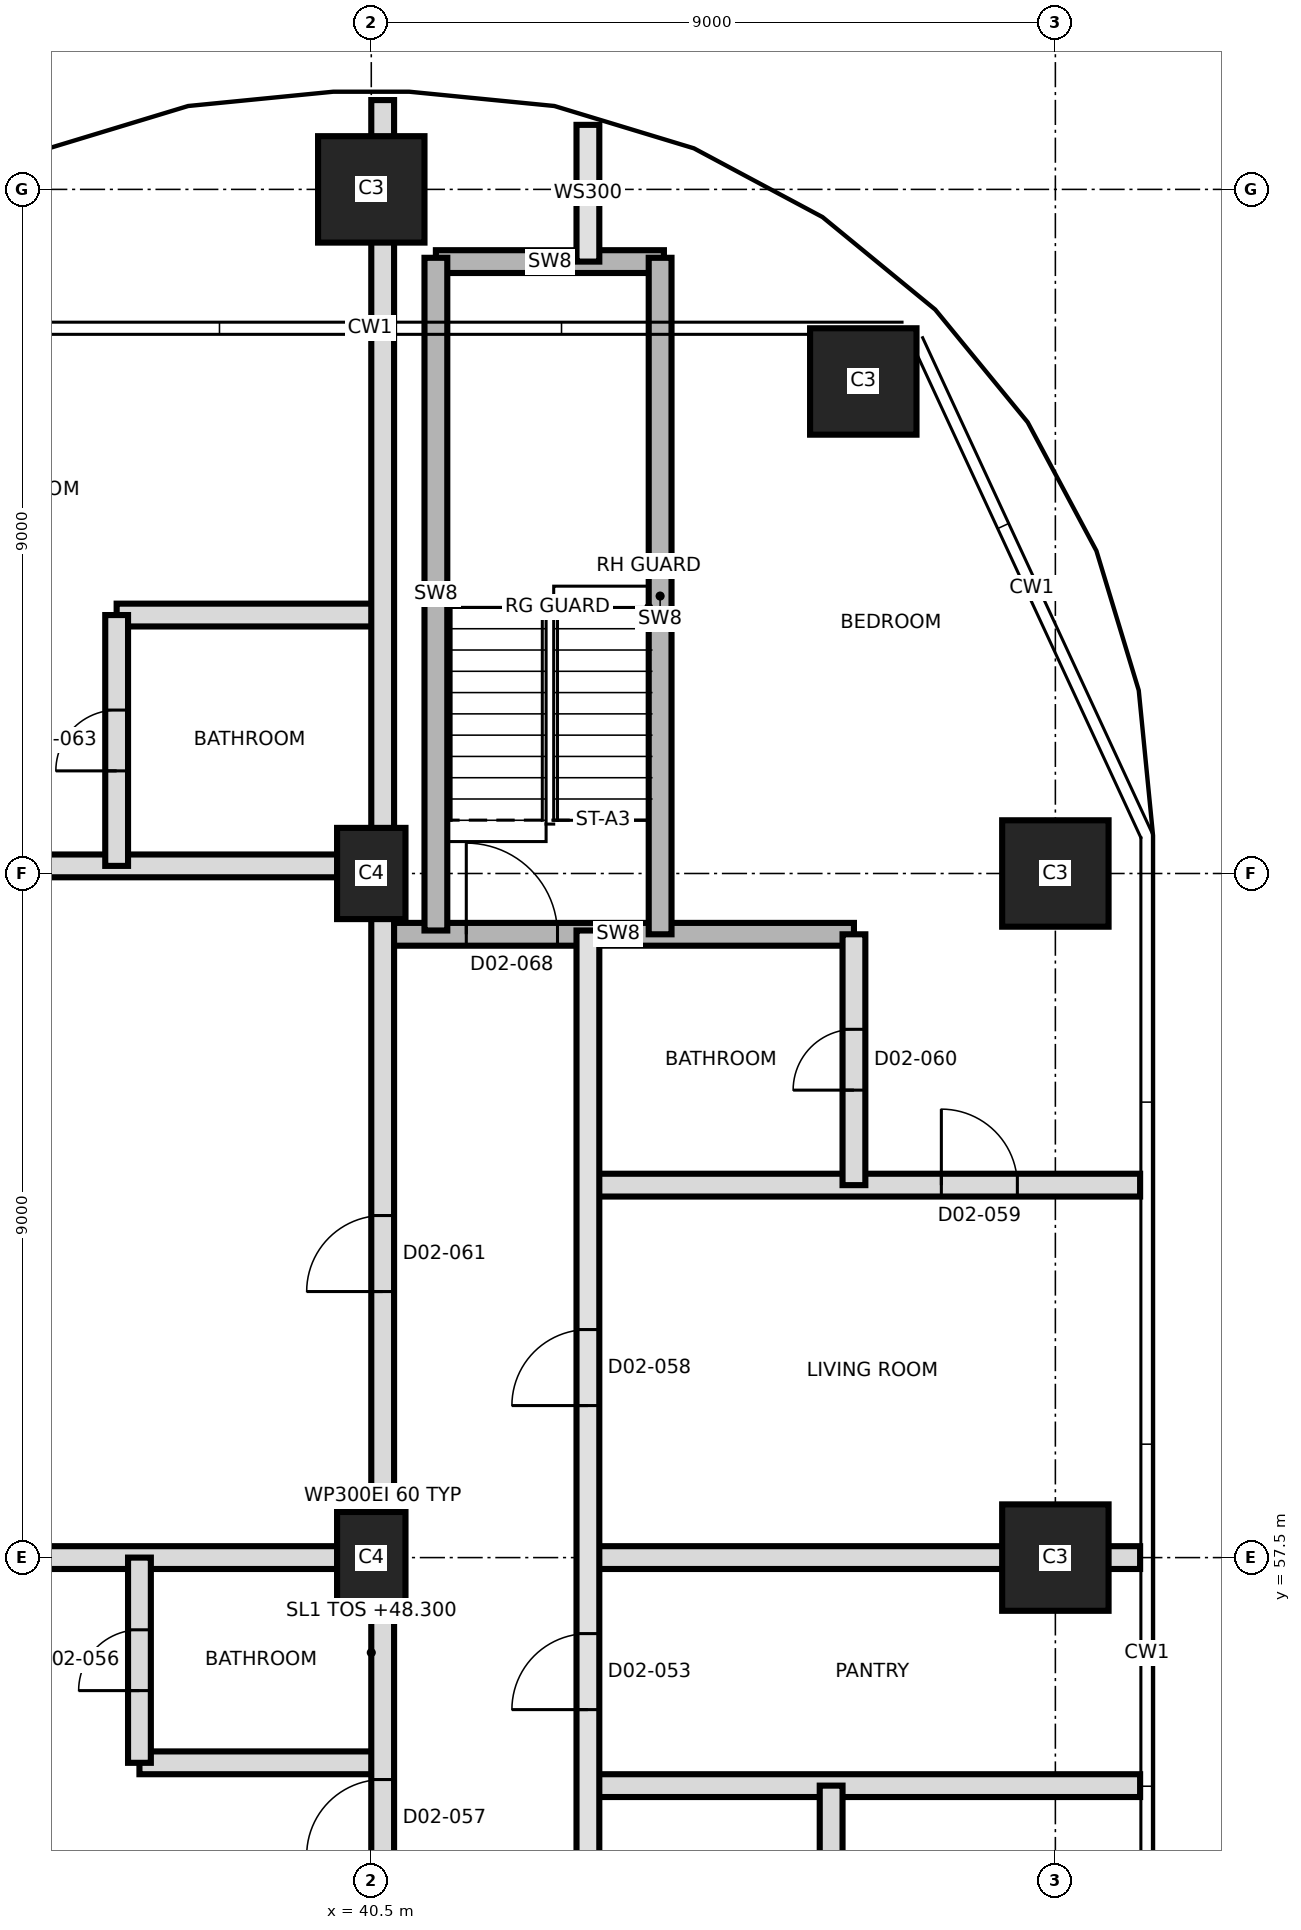
"""IFC4 building model, lengths in metres.
Left out: names, types, materials, properties, quantities, classifications, styles, units other than length and angle.
Written with IfcOpenShell. Run it as: python <this file> out.ifc"""

import sys

from ifc_helpers import new_model, si_unit, direction, frame, frame_2d, origin, origin_2d, place, context, subcontext, project, spatial, rectangle, extrude, element, fill, save


model = new_model("IFC4")
c1 = context("Model", 3, precision=1e-05, world=origin(), true_north=direction((0.0, 1.0)))
c2 = subcontext(c1, "Body", "Model", "MODEL_VIEW")
j1 = project(units=[si_unit("LENGTHUNIT", "METRE"), si_unit("PLANEANGLEUNIT", "RADIAN")], contexts=[c1])
p1 = place(None, origin())
s1 = spatial("IfcSite", under=j1, at=p1, CompositionType="ELEMENT")
p2 = place(p1, origin())
s2 = spatial("IfcBuilding", under=s1, at=p2, CompositionType="ELEMENT")
p3 = place(p2, frame((0.0, 0.0, 48.3)))
s3 = spatial("IfcBuildingStorey", under=s2, at=p3, CompositionType="ELEMENT", Elevation=48.3)
p4 = place(p3, frame((40.5, 57.5, 0.0), z_axis=(0.0, 0.0, 1.0), x_axis=(0.0, 1.0, 0.0)))
e1 = element("IfcColumn", 1, at=p4, inside=s3, PredefinedType="COLUMN", context=c2, shape_type="SweptSolid", body=[
    extrude(rectangle(XDim=1.2, YDim=0.9, at=origin_2d()), origin(), (0.0, 0.0, 1.0), 3.7),
])
p5 = place(p3, frame((49.5, 57.5, 0.0), z_axis=(0.0, 0.0, 1.0), x_axis=(1.0, 0.0, 0.0)))
e2 = element("IfcColumn", 2, at=p5, inside=s3, PredefinedType="COLUMN", context=c2, shape_type="SweptSolid", body=[
    extrude(rectangle(XDim=1.4, YDim=1.4, at=origin_2d()), origin(), (0.0, 0.0, 1.0), 3.7),
])
p6 = place(p3, frame((40.5, 66.5, 0.0), z_axis=(0.0, 0.0, 1.0), x_axis=(0.0, 1.0, 0.0)))
e3 = element("IfcColumn", 3, at=p6, inside=s3, PredefinedType="COLUMN", context=c2, shape_type="SweptSolid", body=[
    extrude(rectangle(XDim=1.2, YDim=0.9, at=origin_2d()), origin(), (0.0, 0.0, 1.0), 3.7),
])
for number, where, z_axis, x_axis in (
    (4, (49.5, 66.5, 0.0), (0.0, 0.0, 1.0), (1.0, 0.0, 0.0)),
    (5, (46.973, 72.973, 0.0), (0.0, 0.0, 1.0), (1.0, 0.0, 0.0)),
    (6, (40.5, 75.5, 0.0), (0.0, 0.0, 1.0), (1.0, 0.0, 0.0)),
):
    element("IfcColumn", number, at=place(p3, frame(where, z_axis=z_axis, x_axis=x_axis)), inside=s3, PredefinedType="COLUMN", context=c2, shape_type="SweptSolid", body=[
        extrude(rectangle(XDim=1.4, YDim=1.4, at=origin_2d()), origin(), (0.0, 0.0, 1.0), 3.7),
    ])
p7 = place(p3, frame((43.35, 54.5, 0.0), z_axis=(0.0, 0.0, 1.0), x_axis=(1.0, 0.0, 0.0)))
e7 = element("IfcWall", 7, at=p7, inside=s3, PredefinedType="PARTITIONING", context=c2, shape_type="SweptSolid", body=[
    extrude(rectangle(XDim=7.265, YDim=0.3, at=frame_2d((3.632, 0.0))), origin(), (0.0, 0.0, 1.0), 3.4),
])
p8 = place(p3, frame((37.45, 54.8, 0.0), z_axis=(0.0, 0.0, 1.0), x_axis=(1.0, 0.0, 0.0)))
e8 = element("IfcWall", 8, at=p8, inside=s3, PredefinedType="PARTITIONING", context=c2, shape_type="SweptSolid", body=[
    extrude(rectangle(XDim=3.2, YDim=0.3, at=frame_2d((1.6, 0.0))), origin(), (0.0, 0.0, 1.0), 3.4),
])
p9 = place(p3, frame((30.565, 57.5, 0.0), z_axis=(0.0, 0.0, 1.0), x_axis=(1.0, 0.0, 0.0)))
e9 = element("IfcWall", 9, at=p9, inside=s3, PredefinedType="PARTITIONING", context=c2, shape_type="SweptSolid", body=[
    extrude(rectangle(XDim=10.085, YDim=0.3, at=frame_2d((5.042, 0.0))), origin(), (0.0, 0.0, 1.0), 3.4),
])
p10 = place(p3, frame((43.35, 57.5, 0.0), z_axis=(0.0, 0.0, 1.0), x_axis=(1.0, 0.0, 0.0)))
e10 = element("IfcWall", 10, at=p10, inside=s3, PredefinedType="PARTITIONING", context=c2, shape_type="SweptSolid", body=[
    extrude(rectangle(XDim=7.265, YDim=0.3, at=frame_2d((3.632, 0.0))), origin(), (0.0, 0.0, 1.0), 3.4),
])
p11 = place(p3, frame((43.35, 62.4, 0.0), z_axis=(0.0, 0.0, 1.0), x_axis=(1.0, 0.0, 0.0)))
e11 = element("IfcWall", 11, at=p11, inside=s3, PredefinedType="PARTITIONING", context=c2, shape_type="SweptSolid", body=[
    extrude(rectangle(XDim=7.265, YDim=0.3, at=frame_2d((3.632, 0.0))), origin(), (0.0, 0.0, 1.0), 3.4),
])
p12 = place(p11, frame((4.65, 0.0, 0.0)))
e12 = element("IfcOpeningElement", 12, at=p12, cuts=e11, PredefinedType="OPENING", context=c2, shape_type="SweptSolid", body=[
    extrude(rectangle(XDim=1.0, YDim=2.1, at=frame_2d((0.5, 1.05))), frame((0.0, 0.16, 0.0), z_axis=(0.0, -1.0, 0.0), x_axis=(1.0, 0.0, 0.0)), (0.0, 0.0, 1.0), 0.32),
])
p13 = place(p3, frame((40.65, 65.7, 0.0), z_axis=(0.0, 0.0, 1.0), x_axis=(1.0, 0.0, 0.0)))
e13 = element("IfcWall", 13, at=p13, inside=s3, PredefinedType="SHEAR", context=c2, shape_type="SweptSolid", body=[
    extrude(rectangle(XDim=6.2, YDim=0.3, at=frame_2d((3.1, 0.0))), origin(), (0.0, 0.0, 1.0), 3.4),
])
p14 = place(p13, frame((1.1, 0.0, 0.0)))
e14 = element("IfcOpeningElement", 14, at=p14, cuts=e13, PredefinedType="OPENING", context=c2, shape_type="SweptSolid", body=[
    extrude(rectangle(XDim=1.2, YDim=2.1, at=frame_2d((0.6, 1.05))), frame((0.0, 0.16, 0.0), z_axis=(0.0, -1.0, 0.0), x_axis=(1.0, 0.0, 0.0)), (0.0, 0.0, 1.0), 0.32),
])
p15 = place(p3, frame((30.565, 66.6, 0.0), z_axis=(0.0, 0.0, 1.0), x_axis=(1.0, 0.0, 0.0)))
e15 = element("IfcWall", 15, at=p15, inside=s3, PredefinedType="PARTITIONING", context=c2, shape_type="SweptSolid", body=[
    extrude(rectangle(XDim=10.085, YDim=0.3, at=frame_2d((5.042, 0.0))), origin(), (0.0, 0.0, 1.0), 3.4),
])
p16 = place(p15, frame((4.435, 0.0, 0.0)))
e16 = element("IfcOpeningElement", 16, at=p16, cuts=e15, PredefinedType="OPENING", context=c2, shape_type="SweptSolid", body=[
    extrude(rectangle(XDim=1.0, YDim=2.1, at=frame_2d((0.5, 1.05))), frame((0.0, 0.16, 0.0), z_axis=(0.0, -1.0, 0.0), x_axis=(1.0, 0.0, 0.0)), (0.0, 0.0, 1.0), 0.32),
])
p17 = place(p3, frame((37.15, 69.9, 0.0), z_axis=(0.0, 0.0, 1.0), x_axis=(1.0, 0.0, 0.0)))
e17 = element("IfcWall", 17, at=p17, inside=s3, PredefinedType="PARTITIONING", context=c2, shape_type="SweptSolid", body=[
    extrude(rectangle(XDim=3.5, YDim=0.3, at=frame_2d((1.75, 0.0))), origin(), (0.0, 0.0, 1.0), 3.4),
])
p18 = place(p3, frame((41.35, 74.55, 0.0), z_axis=(0.0, 0.0, 1.0), x_axis=(1.0, 0.0, 0.0)))
e18 = element("IfcWall", 18, at=p18, inside=s3, PredefinedType="SHEAR", context=c2, shape_type="SweptSolid", body=[
    extrude(rectangle(XDim=3.0, YDim=0.3, at=frame_2d((1.5, 0.0))), origin(), (0.0, 0.0, 1.0), 3.4),
])
p19 = place(p3, frame((37.15, 66.6, 0.0), z_axis=(0.0, 0.0, 1.0), x_axis=(0.0, 1.0, 0.0)))
e19 = element("IfcWall", 19, at=p19, inside=s3, PredefinedType="PARTITIONING", context=c2, shape_type="SweptSolid", body=[
    extrude(rectangle(XDim=3.3, YDim=0.3, at=frame_2d((1.65, 0.0))), origin(), (0.0, 0.0, 1.0), 3.4),
])
p20 = place(p19, frame((1.25, 0.0, 0.0)))
e20 = element("IfcOpeningElement", 20, at=p20, cuts=e19, PredefinedType="OPENING", context=c2, shape_type="SweptSolid", body=[
    extrude(rectangle(XDim=0.8, YDim=2.1, at=frame_2d((0.4, 1.05))), frame((0.0, 0.16, 0.0), z_axis=(0.0, -1.0, 0.0), x_axis=(1.0, 0.0, 0.0)), (0.0, 0.0, 1.0), 0.32),
])
p21 = place(p3, frame((37.45, 54.8, 0.0), z_axis=(0.0, 0.0, 1.0), x_axis=(0.0, 1.0, 0.0)))
e21 = element("IfcWall", 21, at=p21, inside=s3, PredefinedType="PARTITIONING", context=c2, shape_type="SweptSolid", body=[
    extrude(rectangle(XDim=2.7, YDim=0.3, at=frame_2d((1.35, 0.0))), origin(), (0.0, 0.0, 1.0), 3.4),
])
p22 = place(p21, frame((0.95, 0.0, 0.0)))
e22 = element("IfcOpeningElement", 22, at=p22, cuts=e21, PredefinedType="OPENING", context=c2, shape_type="SweptSolid", body=[
    extrude(rectangle(XDim=0.8, YDim=2.1, at=frame_2d((0.4, 1.05))), frame((0.0, 0.16, 0.0), z_axis=(0.0, -1.0, 0.0), x_axis=(1.0, 0.0, 0.0)), (0.0, 0.0, 1.0), 0.32),
])
p23 = place(p3, frame((40.65, 39.95, 0.0), z_axis=(0.0, 0.0, 1.0), x_axis=(0.0, 1.0, 0.0)))
e23 = element("IfcWall", 23, at=p23, inside=s3, PredefinedType="PARTITIONING", context=c2, shape_type="SweptSolid", body=[
    extrude(rectangle(XDim=36.725, YDim=0.3, at=frame_2d((18.363, 0.0))), origin(), (0.0, 0.0, 1.0), 3.4),
])
p24 = place(p23, frame((0.685, 0.0, 0.0)))
e24 = element("IfcOpeningElement", 24, at=p24, cuts=e23, PredefinedType="OPENING", context=c2, shape_type="SweptSolid", body=[
    extrude(rectangle(XDim=1.2, YDim=2.1, at=frame_2d((0.6, 1.05))), frame((0.0, 0.16, 0.0), z_axis=(0.0, -1.0, 0.0), x_axis=(1.0, 0.0, 0.0)), (0.0, 0.0, 1.0), 0.32),
])
p25 = place(p23, frame((3.935, 0.0, 0.0)))
e25 = element("IfcOpeningElement", 25, at=p25, cuts=e23, PredefinedType="OPENING", context=c2, shape_type="SweptSolid", body=[
    extrude(rectangle(XDim=1.0, YDim=2.1, at=frame_2d((0.5, 1.05))), frame((0.0, 0.16, 0.0), z_axis=(0.0, -1.0, 0.0), x_axis=(1.0, 0.0, 0.0)), (0.0, 0.0, 1.0), 0.32),
])
p26 = place(p23, frame((11.83, 0.0, 0.0)))
e26 = element("IfcOpeningElement", 26, at=p26, cuts=e23, PredefinedType="OPENING", context=c2, shape_type="SweptSolid", body=[
    extrude(rectangle(XDim=1.0, YDim=2.1, at=frame_2d((0.5, 1.05))), frame((0.0, 0.16, 0.0), z_axis=(0.0, -1.0, 0.0), x_axis=(1.0, 0.0, 0.0)), (0.0, 0.0, 1.0), 0.32),
])
p27 = place(p23, frame((13.63, 0.0, 0.0)))
e27 = element("IfcOpeningElement", 27, at=p27, cuts=e23, PredefinedType="OPENING", context=c2, shape_type="SweptSolid", body=[
    extrude(rectangle(XDim=1.0, YDim=2.1, at=frame_2d((0.5, 1.05))), frame((0.0, 0.16, 0.0), z_axis=(0.0, -1.0, 0.0), x_axis=(1.0, 0.0, 0.0)), (0.0, 0.0, 1.0), 0.32),
])
p28 = place(p23, frame((21.05, 0.0, 0.0)))
e28 = element("IfcOpeningElement", 28, at=p28, cuts=e23, PredefinedType="OPENING", context=c2, shape_type="SweptSolid", body=[
    extrude(rectangle(XDim=1.0, YDim=2.4, at=frame_2d((0.5, 1.2))), frame((0.0, 0.16, 0.0), z_axis=(0.0, -1.0, 0.0), x_axis=(1.0, 0.0, 0.0)), (0.0, 0.0, 1.0), 0.32),
])
p29 = place(p3, frame((41.35, 65.75, 0.0), z_axis=(0.0, 0.0, 1.0), x_axis=(0.0, 1.0, 0.0)))
e29 = element("IfcWall", 29, at=p29, inside=s3, PredefinedType="SHEAR", context=c2, shape_type="SweptSolid", body=[
    extrude(rectangle(XDim=8.85, YDim=0.3, at=frame_2d((4.425, 0.0))), origin(), (0.0, 0.0, 1.0), 3.4),
])
p30 = place(p3, frame((43.35, 39.95, 0.0), z_axis=(0.0, 0.0, 1.0), x_axis=(0.0, 1.0, 0.0)))
e30 = element("IfcWall", 30, at=p30, inside=s3, PredefinedType="SOLIDWALL", context=c2, shape_type="SweptSolid", body=[
    extrude(rectangle(XDim=25.8, YDim=0.3, at=frame_2d((12.9, 0.0))), origin(), (0.0, 0.0, 1.0), 3.4),
])
p31 = place(p30, frame((3.55, 0.0, 0.0)))
e31 = element("IfcOpeningElement", 31, at=p31, cuts=e30, PredefinedType="OPENING", context=c2, shape_type="SweptSolid", body=[
    extrude(rectangle(XDim=1.0, YDim=2.4, at=frame_2d((0.5, 1.2))), frame((0.0, 0.16, 0.0), z_axis=(0.0, -1.0, 0.0), x_axis=(1.0, 0.0, 0.0)), (0.0, 0.0, 1.0), 0.32),
])
p32 = place(p30, frame((9.7, 0.0, 0.0)))
e32 = element("IfcOpeningElement", 32, at=p32, cuts=e30, PredefinedType="OPENING", context=c2, shape_type="SweptSolid", body=[
    extrude(rectangle(XDim=1.0, YDim=2.1, at=frame_2d((0.5, 1.05))), frame((0.0, 0.16, 0.0), z_axis=(0.0, -1.0, 0.0), x_axis=(1.0, 0.0, 0.0)), (0.0, 0.0, 1.0), 0.32),
])
p33 = place(p30, frame((15.55, 0.0, 0.0)))
e33 = element("IfcOpeningElement", 33, at=p33, cuts=e30, PredefinedType="OPENING", context=c2, shape_type="SweptSolid", body=[
    extrude(rectangle(XDim=1.0, YDim=2.1, at=frame_2d((0.5, 1.05))), frame((0.0, 0.16, 0.0), z_axis=(0.0, -1.0, 0.0), x_axis=(1.0, 0.0, 0.0)), (0.0, 0.0, 1.0), 0.32),
])
p34 = place(p30, frame((19.55, 0.0, 0.0)))
e34 = element("IfcOpeningElement", 34, at=p34, cuts=e30, PredefinedType="OPENING", context=c2, shape_type="SweptSolid", body=[
    extrude(rectangle(XDim=1.0, YDim=2.4, at=frame_2d((0.5, 1.2))), frame((0.0, 0.16, 0.0), z_axis=(0.0, -1.0, 0.0), x_axis=(1.0, 0.0, 0.0)), (0.0, 0.0, 1.0), 0.32),
])
p35 = place(p3, frame((43.35, 74.55, 0.0), z_axis=(0.0, 0.0, 1.0), x_axis=(0.0, 1.0, 0.0)))
e35 = element("IfcWall", 35, at=p35, inside=s3, PredefinedType="SOLIDWALL", context=c2, shape_type="SweptSolid", body=[
    extrude(rectangle(XDim=1.799, YDim=0.3, at=frame_2d((0.899, 0.0))), origin(), (0.0, 0.0, 1.0), 3.4),
])
p36 = place(p3, frame((44.3, 65.7, 0.0), z_axis=(0.0, 0.0, 1.0), x_axis=(0.0, 1.0, 0.0)))
e36 = element("IfcWall", 36, at=p36, inside=s3, PredefinedType="SHEAR", context=c2, shape_type="SweptSolid", body=[
    extrude(rectangle(XDim=8.9, YDim=0.3, at=frame_2d((4.45, 0.0))), origin(), (0.0, 0.0, 1.0), 3.4),
])
p37 = place(p3, frame((46.55, 51.8, 0.0), z_axis=(0.0, 0.0, 1.0), x_axis=(0.0, 1.0, 0.0)))
e37 = element("IfcWall", 37, at=p37, inside=s3, PredefinedType="PARTITIONING", context=c2, shape_type="SweptSolid", body=[
    extrude(rectangle(XDim=2.7, YDim=0.3, at=frame_2d((1.35, 0.0))), origin(), (0.0, 0.0, 1.0), 3.4),
])
p38 = place(p37, frame((0.95, 0.0, 0.0)))
e38 = element("IfcOpeningElement", 38, at=p38, cuts=e37, PredefinedType="OPENING", context=c2, shape_type="SweptSolid", body=[
    extrude(rectangle(XDim=0.8, YDim=2.1, at=frame_2d((0.4, 1.05))), frame((0.0, 0.16, 0.0), z_axis=(0.0, -1.0, 0.0), x_axis=(1.0, 0.0, 0.0)), (0.0, 0.0, 1.0), 0.32),
])
p39 = place(p3, frame((46.85, 62.4, 0.0), z_axis=(0.0, 0.0, 1.0), x_axis=(0.0, 1.0, 0.0)))
e39 = element("IfcWall", 39, at=p39, inside=s3, PredefinedType="PARTITIONING", context=c2, shape_type="SweptSolid", body=[
    extrude(rectangle(XDim=3.3, YDim=0.3, at=frame_2d((1.65, 0.0))), origin(), (0.0, 0.0, 1.0), 3.4),
])
p40 = place(p39, frame((1.25, 0.0, 0.0)))
e40 = element("IfcOpeningElement", 40, at=p40, cuts=e39, PredefinedType="OPENING", context=c2, shape_type="SweptSolid", body=[
    extrude(rectangle(XDim=0.8, YDim=2.1, at=frame_2d((0.4, 1.05))), frame((0.0, 0.16, 0.0), z_axis=(0.0, -1.0, 0.0), x_axis=(1.0, 0.0, 0.0)), (0.0, 0.0, 1.0), 0.32),
])
p41 = place(p33, origin())
e41 = element("IfcDoor", 41, at=p41, inside=s3, OperationType="SINGLE_SWING_LEFT", PredefinedType="DOOR", context=c2, shape_type="SweptSolid", body=[
    extrude(rectangle(XDim=1.0, YDim=2.1, at=frame_2d((0.5, 1.05))), frame((0.0, 0.025, 0.0), z_axis=(0.0, -1.0, 0.0), x_axis=(1.0, 0.0, 0.0)), (0.0, 0.0, 1.0), 0.05),
])
fill(e33, e41)
p42 = place(p22, origin())
e42 = element("IfcDoor", 42, at=p42, inside=s3, OperationType="SINGLE_SWING_LEFT", PredefinedType="DOOR", context=c2, shape_type="SweptSolid", body=[
    extrude(rectangle(XDim=0.8, YDim=2.1, at=frame_2d((0.4, 1.05))), frame((0.0, 0.025, 0.0), z_axis=(0.0, -1.0, 0.0), x_axis=(1.0, 0.0, 0.0)), (0.0, 0.0, 1.0), 0.05),
])
fill(e22, e42)
p43 = place(p27, origin())
e43 = element("IfcDoor", 43, at=p43, inside=s3, OperationType="SINGLE_SWING_LEFT", PredefinedType="DOOR", context=c2, shape_type="SweptSolid", body=[
    extrude(rectangle(XDim=1.0, YDim=2.1, at=frame_2d((0.5, 1.05))), frame((0.0, 0.025, 0.0), z_axis=(0.0, -1.0, 0.0), x_axis=(1.0, 0.0, 0.0)), (0.0, 0.0, 1.0), 0.05),
])
fill(e27, e43)
p44 = place(p34, origin())
e44 = element("IfcDoor", 44, at=p44, inside=s3, OperationType="SINGLE_SWING_RIGHT", PredefinedType="DOOR", context=c2, shape_type="SweptSolid", body=[
    extrude(rectangle(XDim=1.0, YDim=2.4, at=frame_2d((0.5, 1.2))), frame((0.0, 0.025, 0.0), z_axis=(0.0, -1.0, 0.0), x_axis=(1.0, 0.0, 0.0)), (0.0, 0.0, 1.0), 0.05),
])
fill(e34, e44)
p45 = place(p12, origin())
e45 = element("IfcDoor", 45, at=p45, inside=s3, OperationType="SINGLE_SWING_LEFT", PredefinedType="DOOR", context=c2, shape_type="SweptSolid", body=[
    extrude(rectangle(XDim=1.0, YDim=2.1, at=frame_2d((0.5, 1.05))), frame((0.0, 0.025, 0.0), z_axis=(0.0, -1.0, 0.0), x_axis=(1.0, 0.0, 0.0)), (0.0, 0.0, 1.0), 0.05),
])
fill(e12, e45)
p46 = place(p40, origin())
e46 = element("IfcDoor", 46, at=p46, inside=s3, OperationType="SINGLE_SWING_LEFT", PredefinedType="DOOR", context=c2, shape_type="SweptSolid", body=[
    extrude(rectangle(XDim=0.8, YDim=2.1, at=frame_2d((0.4, 1.05))), frame((0.0, 0.025, 0.0), z_axis=(0.0, -1.0, 0.0), x_axis=(1.0, 0.0, 0.0)), (0.0, 0.0, 1.0), 0.05),
])
fill(e40, e46)
p47 = place(p28, origin())
e47 = element("IfcDoor", 47, at=p47, inside=s3, OperationType="SINGLE_SWING_RIGHT", PredefinedType="DOOR", context=c2, shape_type="SweptSolid", body=[
    extrude(rectangle(XDim=1.0, YDim=2.4, at=frame_2d((0.5, 1.2))), frame((0.0, 0.025, 0.0), z_axis=(0.0, -1.0, 0.0), x_axis=(1.0, 0.0, 0.0)), (0.0, 0.0, 1.0), 0.05),
])
fill(e28, e47)
p48 = place(p20, origin())
e48 = element("IfcDoor", 48, at=p48, inside=s3, OperationType="SINGLE_SWING_LEFT", PredefinedType="DOOR", context=c2, shape_type="SweptSolid", body=[
    extrude(rectangle(XDim=0.8, YDim=2.1, at=frame_2d((0.4, 1.05))), frame((0.0, 0.025, 0.0), z_axis=(0.0, -1.0, 0.0), x_axis=(1.0, 0.0, 0.0)), (0.0, 0.0, 1.0), 0.05),
])
fill(e20, e48)
p49 = place(p14, origin())
e49 = element("IfcDoor", 49, at=p49, inside=s3, OperationType="SINGLE_SWING_RIGHT", PredefinedType="DOOR", context=c2, shape_type="SweptSolid", body=[
    extrude(rectangle(XDim=1.2, YDim=2.1, at=frame_2d((0.6, 1.05))), frame((0.0, 0.025, 0.0), z_axis=(0.0, -1.0, 0.0), x_axis=(1.0, 0.0, 0.0)), (0.0, 0.0, 1.0), 0.05),
])
fill(e14, e49)
save(model, sys.argv[1])
